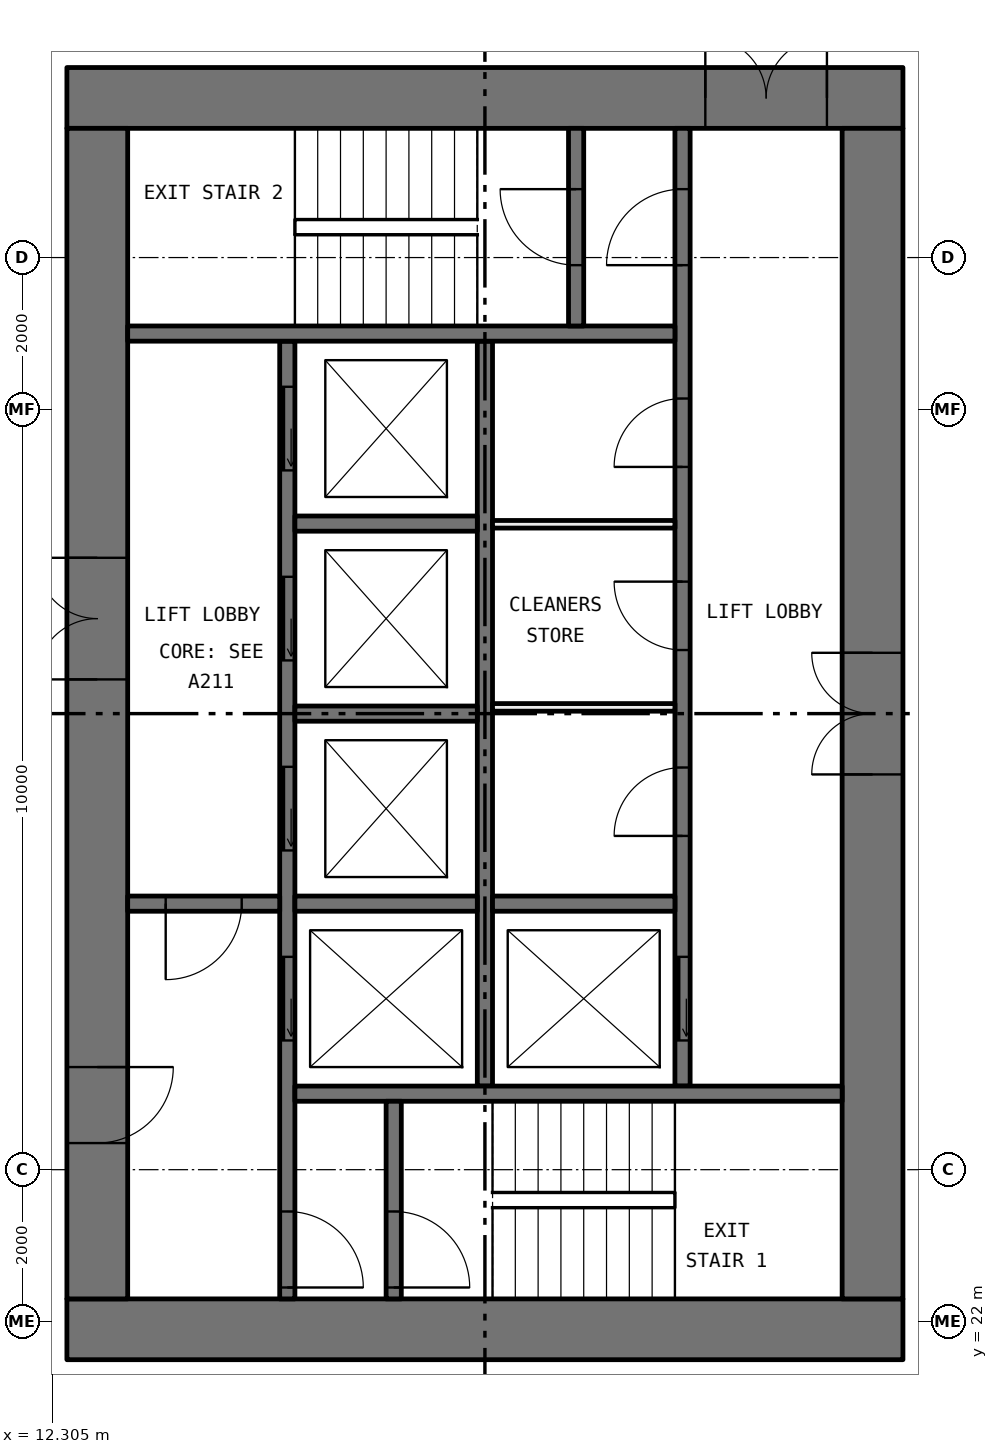
"""IFC4 building model, lengths in metres.
Left out: names, types, materials, properties, quantities, classifications, styles, units other than length and angle.
Written with IfcOpenShell. Run it as: python <this file> out.ifc"""

import sys

from ifc_helpers import new_model, si_unit, direction, frame, frame_2d, origin, place, context, subcontext, project, spatial, rectangle, extrude, element, fill, save


model = new_model("IFC4")
c1 = context("Model", 3, precision=1e-05, world=origin(), true_north=direction((0.0, 1.0)))
c2 = subcontext(c1, "Body", "Model", "MODEL_VIEW")
j1 = project(units=[si_unit("LENGTHUNIT", "METRE"), si_unit("PLANEANGLEUNIT", "RADIAN")], contexts=[c1])
p1 = place(None, origin())
s1 = spatial("IfcSite", under=j1, at=p1, CompositionType="ELEMENT")
p2 = place(p1, origin())
s2 = spatial("IfcBuilding", under=s1, at=p2, CompositionType="ELEMENT")
p3 = place(p2, frame((0.0, 0.0, 47.25)))
s3 = spatial("IfcBuildingStorey", under=s2, at=p3, CompositionType="ELEMENT", Elevation=47.25)
p4 = place(p3, frame((12.5, 21.9, 0.0), z_axis=(0.0, 0.0, 1.0), x_axis=(1.0, 0.0, 0.0)))
e1 = element("IfcWall", 1, at=p4, inside=s3, PredefinedType="SHEAR", context=c2, shape_type="SweptSolid", body=[
    extrude(rectangle(XDim=11.0, YDim=0.8, at=frame_2d((5.5, 0.0))), origin(), (0.0, 0.0, 1.0), 3.05),
])
p5 = place(p3, frame((12.5, 38.1, 0.0), z_axis=(0.0, 0.0, 1.0), x_axis=(1.0, 0.0, 0.0)))
e2 = element("IfcWall", 2, at=p5, inside=s3, PredefinedType="SHEAR", context=c2, shape_type="SweptSolid", body=[
    extrude(rectangle(XDim=11.0, YDim=0.8, at=frame_2d((5.5, 0.0))), origin(), (0.0, 0.0, 1.0), 3.05),
])
p6 = place(p5, frame((8.4, 0.0, 0.0)))
e3 = element("IfcOpeningElement", 3, at=p6, cuts=e2, PredefinedType="OPENING", context=c2, shape_type="SweptSolid", body=[
    extrude(rectangle(XDim=1.6, YDim=2.1, at=frame_2d((0.8, 1.05))), frame((0.0, 0.41, 0.0), z_axis=(0.0, -1.0, 0.0), x_axis=(1.0, 0.0, 0.0)), (0.0, 0.0, 1.0), 0.82),
])
p7 = place(p3, frame((12.9, 22.3, 0.0), z_axis=(0.0, 0.0, 1.0), x_axis=(0.0, 1.0, 0.0)))
e4 = element("IfcWall", 4, at=p7, inside=s3, PredefinedType="SHEAR", context=c2, shape_type="SweptSolid", body=[
    extrude(rectangle(XDim=15.4, YDim=0.8, at=frame_2d((7.7, 0.0))), origin(), (0.0, 0.0, 1.0), 3.05),
])
p8 = place(p7, frame((8.15, 0.0, 0.0)))
e5 = element("IfcOpeningElement", 5, at=p8, cuts=e4, PredefinedType="OPENING", context=c2, shape_type="SweptSolid", body=[
    extrude(rectangle(XDim=1.6, YDim=2.1, at=frame_2d((0.8, 1.05))), frame((0.0, 0.41, 0.0), z_axis=(0.0, -1.0, 0.0), x_axis=(1.0, 0.0, 0.0)), (0.0, 0.0, 1.0), 0.82),
])
p9 = place(p7, frame((2.05, 0.0, 0.0)))
e6 = element("IfcOpeningElement", 6, at=p9, cuts=e4, PredefinedType="OPENING", context=c2, shape_type="SweptSolid", body=[
    extrude(rectangle(XDim=1.0, YDim=2.1, at=frame_2d((0.5, 1.05))), frame((0.0, 0.41, 0.0), z_axis=(0.0, -1.0, 0.0), x_axis=(1.0, 0.0, 0.0)), (0.0, 0.0, 1.0), 0.82),
])
p10 = place(p3, frame((23.1, 22.3, 0.0), z_axis=(0.0, 0.0, 1.0), x_axis=(0.0, 1.0, 0.0)))
e7 = element("IfcWall", 7, at=p10, inside=s3, PredefinedType="SHEAR", context=c2, shape_type="SweptSolid", body=[
    extrude(rectangle(XDim=15.4, YDim=0.8, at=frame_2d((7.7, 0.0))), origin(), (0.0, 0.0, 1.0), 3.05),
])
p11 = place(p10, frame((6.9, 0.0, 0.0)))
e8 = element("IfcOpeningElement", 8, at=p11, cuts=e7, PredefinedType="OPENING", context=c2, shape_type="SweptSolid", body=[
    extrude(rectangle(XDim=1.6, YDim=2.1, at=frame_2d((0.8, 1.05))), frame((0.0, 0.41, 0.0), z_axis=(0.0, -1.0, 0.0), x_axis=(1.0, 0.0, 0.0)), (0.0, 0.0, 1.0), 0.82),
])
p12 = place(p3, frame((15.4, 22.3, 0.0), z_axis=(0.0, 0.0, 1.0), x_axis=(0.0, 1.0, 0.0)))
e9 = element("IfcWall", 9, at=p12, inside=s3, PredefinedType="SOLIDWALL", context=c2, shape_type="SweptSolid", body=[
    extrude(rectangle(XDim=12.6, YDim=0.2, at=frame_2d((6.3, 0.0))), origin(), (0.0, 0.0, 1.0), 3.05),
])
p13 = place(p12, frame((3.4, 0.0, 0.0)))
e10 = element("IfcOpeningElement", 10, at=p13, cuts=e9, PredefinedType="OPENING", context=c2, shape_type="SweptSolid", body=[
    extrude(rectangle(XDim=1.1, YDim=2.1, at=frame_2d((0.55, 1.05))), frame((0.0, 0.11, 0.0), z_axis=(0.0, -1.0, 0.0), x_axis=(1.0, 0.0, 0.0)), (0.0, 0.0, 1.0), 0.22),
])
p14 = place(p12, frame((5.9, 0.0, 0.0)))
e11 = element("IfcOpeningElement", 11, at=p14, cuts=e9, PredefinedType="OPENING", context=c2, shape_type="SweptSolid", body=[
    extrude(rectangle(XDim=1.1, YDim=2.1, at=frame_2d((0.55, 1.05))), frame((0.0, 0.11, 0.0), z_axis=(0.0, -1.0, 0.0), x_axis=(1.0, 0.0, 0.0)), (0.0, 0.0, 1.0), 0.22),
])
p15 = place(p12, frame((8.4, 0.0, 0.0)))
e12 = element("IfcOpeningElement", 12, at=p15, cuts=e9, PredefinedType="OPENING", context=c2, shape_type="SweptSolid", body=[
    extrude(rectangle(XDim=1.1, YDim=2.1, at=frame_2d((0.55, 1.05))), frame((0.0, 0.11, 0.0), z_axis=(0.0, -1.0, 0.0), x_axis=(1.0, 0.0, 0.0)), (0.0, 0.0, 1.0), 0.22),
])
p16 = place(p12, frame((10.9, 0.0, 0.0)))
e13 = element("IfcOpeningElement", 13, at=p16, cuts=e9, PredefinedType="OPENING", context=c2, shape_type="SweptSolid", body=[
    extrude(rectangle(XDim=1.1, YDim=2.1, at=frame_2d((0.55, 1.05))), frame((0.0, 0.11, 0.0), z_axis=(0.0, -1.0, 0.0), x_axis=(1.0, 0.0, 0.0)), (0.0, 0.0, 1.0), 0.22),
])
p17 = place(p12, frame((0.15, 0.0, 0.0)))
e14 = element("IfcOpeningElement", 14, at=p17, cuts=e9, PredefinedType="OPENING", context=c2, shape_type="SweptSolid", body=[
    extrude(rectangle(XDim=1.0, YDim=2.1, at=frame_2d((0.5, 1.05))), frame((0.0, 0.11, 0.0), z_axis=(0.0, -1.0, 0.0), x_axis=(1.0, 0.0, 0.0)), (0.0, 0.0, 1.0), 0.22),
])
p18 = place(p3, frame((20.6, 25.1, 0.0), z_axis=(0.0, 0.0, 1.0), x_axis=(0.0, 1.0, 0.0)))
e15 = element("IfcWall", 15, at=p18, inside=s3, PredefinedType="SOLIDWALL", context=c2, shape_type="SweptSolid", body=[
    extrude(rectangle(XDim=12.6, YDim=0.2, at=frame_2d((6.3, 0.0))), origin(), (0.0, 0.0, 1.0), 3.05),
])
p19 = place(p18, frame((0.6, 0.0, 0.0)))
e16 = element("IfcOpeningElement", 16, at=p19, cuts=e15, PredefinedType="OPENING", context=c2, shape_type="SweptSolid", body=[
    extrude(rectangle(XDim=1.1, YDim=2.1, at=frame_2d((0.55, 1.05))), frame((0.0, 0.11, 0.0), z_axis=(0.0, -1.0, 0.0), x_axis=(1.0, 0.0, 0.0)), (0.0, 0.0, 1.0), 0.22),
])
p20 = place(p18, frame((10.8, 0.0, 0.0)))
e17 = element("IfcOpeningElement", 17, at=p20, cuts=e15, PredefinedType="OPENING", context=c2, shape_type="SweptSolid", body=[
    extrude(rectangle(XDim=1.0, YDim=2.1, at=frame_2d((0.5, 1.05))), frame((0.0, 0.11, 0.0), z_axis=(0.0, -1.0, 0.0), x_axis=(1.0, 0.0, 0.0)), (0.0, 0.0, 1.0), 0.22),
])
p21 = place(p18, frame((3.291, 0.0, 0.0)))
e18 = element("IfcOpeningElement", 18, at=p21, cuts=e15, PredefinedType="OPENING", context=c2, shape_type="SweptSolid", body=[
    extrude(rectangle(XDim=0.9, YDim=2.1, at=frame_2d((0.45, 1.05))), frame((0.0, 0.11, 0.0), z_axis=(0.0, -1.0, 0.0), x_axis=(1.0, 0.0, 0.0)), (0.0, 0.0, 1.0), 0.22),
])
p22 = place(p18, frame((5.737, 0.0, 0.0)))
e19 = element("IfcOpeningElement", 19, at=p22, cuts=e15, PredefinedType="OPENING", context=c2, shape_type="SweptSolid", body=[
    extrude(rectangle(XDim=0.9, YDim=2.1, at=frame_2d((0.45, 1.05))), frame((0.0, 0.11, 0.0), z_axis=(0.0, -1.0, 0.0), x_axis=(1.0, 0.0, 0.0)), (0.0, 0.0, 1.0), 0.22),
])
p23 = place(p18, frame((8.146, 0.0, 0.0)))
e20 = element("IfcOpeningElement", 20, at=p23, cuts=e15, PredefinedType="OPENING", context=c2, shape_type="SweptSolid", body=[
    extrude(rectangle(XDim=0.9, YDim=2.1, at=frame_2d((0.45, 1.05))), frame((0.0, 0.11, 0.0), z_axis=(0.0, -1.0, 0.0), x_axis=(1.0, 0.0, 0.0)), (0.0, 0.0, 1.0), 0.22),
])
p24 = place(p3, frame((18.0, 25.1, 0.0), z_axis=(0.0, 0.0, 1.0), x_axis=(0.0, 1.0, 0.0)))
e21 = element("IfcWall", 21, at=p24, inside=s3, PredefinedType="SOLIDWALL", context=c2, shape_type="SweptSolid", body=[
    extrude(rectangle(XDim=9.8, YDim=0.2, at=frame_2d((4.9, 0.0))), origin(), (0.0, 0.0, 1.0), 3.05),
])
for number, where, z_axis, x_axis in (
    (22, (15.5, 25.0, 0.0), (0.0, 0.0, 1.0), (1.0, 0.0, 0.0)),
    (23, (13.3, 35.0, 0.0), (0.0, 0.0, 1.0), (1.0, 0.0, 0.0)),
):
    element("IfcWall", number, at=place(p3, frame(where, z_axis=z_axis, x_axis=x_axis)), inside=s3, PredefinedType="SOLIDWALL", context=c2, shape_type="SweptSolid", body=[
        extrude(rectangle(XDim=7.2, YDim=0.2, at=frame_2d((3.6, 0.0))), origin(), (0.0, 0.0, 1.0), 3.05),
    ])
p25 = place(p3, frame((13.3, 27.5, 0.0), z_axis=(0.0, 0.0, 1.0), x_axis=(1.0, 0.0, 0.0)))
e24 = element("IfcWall", 24, at=p25, inside=s3, PredefinedType="SOLIDWALL", context=c2, shape_type="SweptSolid", body=[
    extrude(rectangle(XDim=2.0, YDim=0.2, at=frame_2d((1.0, 0.0))), origin(), (0.0, 0.0, 1.0), 3.05),
])
p26 = place(p25, frame((0.5, 0.0, 0.0)))
e25 = element("IfcOpeningElement", 25, at=p26, cuts=e24, PredefinedType="OPENING", context=c2, shape_type="SweptSolid", body=[
    extrude(rectangle(XDim=1.0, YDim=2.1, at=frame_2d((0.5, 1.05))), frame((0.0, 0.11, 0.0), z_axis=(0.0, -1.0, 0.0), x_axis=(1.0, 0.0, 0.0)), (0.0, 0.0, 1.0), 0.22),
])
p27 = place(p3, frame((16.8, 22.3, 0.0), z_axis=(0.0, 0.0, 1.0), x_axis=(0.0, 1.0, 0.0)))
e26 = element("IfcWall", 26, at=p27, inside=s3, PredefinedType="SOLIDWALL", context=c2, shape_type="SweptSolid", body=[
    extrude(rectangle(XDim=2.6, YDim=0.2, at=frame_2d((1.3, 0.0))), origin(), (0.0, 0.0, 1.0), 3.05),
])
p28 = place(p27, frame((0.15, 0.0, 0.0)))
e27 = element("IfcOpeningElement", 27, at=p28, cuts=e26, PredefinedType="OPENING", context=c2, shape_type="SweptSolid", body=[
    extrude(rectangle(XDim=1.0, YDim=2.1, at=frame_2d((0.5, 1.05))), frame((0.0, 0.11, 0.0), z_axis=(0.0, -1.0, 0.0), x_axis=(1.0, 0.0, 0.0)), (0.0, 0.0, 1.0), 0.22),
])
p29 = place(p3, frame((19.2, 35.1, 0.0), z_axis=(0.0, 0.0, 1.0), x_axis=(0.0, 1.0, 0.0)))
e28 = element("IfcWall", 28, at=p29, inside=s3, PredefinedType="SOLIDWALL", context=c2, shape_type="SweptSolid", body=[
    extrude(rectangle(XDim=2.6, YDim=0.2, at=frame_2d((1.3, 0.0))), origin(), (0.0, 0.0, 1.0), 3.05),
])
p30 = place(p29, frame((0.8, 0.0, 0.0)))
e29 = element("IfcOpeningElement", 29, at=p30, cuts=e28, PredefinedType="OPENING", context=c2, shape_type="SweptSolid", body=[
    extrude(rectangle(XDim=1.0, YDim=2.1, at=frame_2d((0.5, 1.05))), frame((0.0, 0.11, 0.0), z_axis=(0.0, -1.0, 0.0), x_axis=(1.0, 0.0, 0.0)), (0.0, 0.0, 1.0), 0.22),
])
for number, where, z_axis, x_axis in (
    (30, (15.5, 27.5, 0.0), (0.0, 0.0, 1.0), (1.0, 0.0, 0.0)),
    (31, (15.5, 30.0, 0.0), (0.0, 0.0, 1.0), (1.0, 0.0, 0.0)),
    (32, (15.5, 32.5, 0.0), (0.0, 0.0, 1.0), (1.0, 0.0, 0.0)),
    (33, (18.1, 27.5, 0.0), (0.0, 0.0, 1.0), (1.0, 0.0, 0.0)),
):
    element("IfcWall", number, at=place(p3, frame(where, z_axis=z_axis, x_axis=x_axis)), inside=s3, PredefinedType="SOLIDWALL", context=c2, shape_type="SweptSolid", body=[
        extrude(rectangle(XDim=2.4, YDim=0.2, at=frame_2d((1.2, 0.0))), origin(), (0.0, 0.0, 1.0), 3.05),
    ])
for number, where, z_axis, x_axis in (
    (34, (18.1, 30.082, 0.0), (0.0, 0.0, 1.0), (1.0, 0.0, 0.0)),
    (35, (18.1, 32.491, 0.0), (0.0, 0.0, 1.0), (1.0, 0.0, 0.0)),
):
    element("IfcWall", number, at=place(p3, frame(where, z_axis=z_axis, x_axis=x_axis)), inside=s3, PredefinedType="PARTITIONING", context=c2, shape_type="SweptSolid", body=[
        extrude(rectangle(XDim=2.4, YDim=0.1, at=frame_2d((1.2, 0.0))), origin(), (0.0, 0.0, 1.0), 3.05),
    ])
p31 = place(p19, origin())
e36 = element("IfcDoor", 36, at=p31, inside=s3, OperationType="SLIDING_TO_LEFT", PredefinedType="DOOR", context=c2, shape_type="SweptSolid", body=[
    extrude(rectangle(XDim=1.1, YDim=2.1, at=frame_2d((0.55, 1.05))), frame((0.0, 0.025, 0.0), z_axis=(0.0, -1.0, 0.0), x_axis=(1.0, 0.0, 0.0)), (0.0, 0.0, 1.0), 0.05),
])
fill(e16, e36)
p32 = place(p13, origin())
e37 = element("IfcDoor", 37, at=p32, inside=s3, OperationType="SLIDING_TO_LEFT", PredefinedType="DOOR", context=c2, shape_type="SweptSolid", body=[
    extrude(rectangle(XDim=1.1, YDim=2.1, at=frame_2d((0.55, 1.05))), frame((0.0, 0.025, 0.0), z_axis=(0.0, -1.0, 0.0), x_axis=(1.0, 0.0, 0.0)), (0.0, 0.0, 1.0), 0.05),
])
fill(e10, e37)
p33 = place(p14, origin())
e38 = element("IfcDoor", 38, at=p33, inside=s3, OperationType="SLIDING_TO_LEFT", PredefinedType="DOOR", context=c2, shape_type="SweptSolid", body=[
    extrude(rectangle(XDim=1.1, YDim=2.1, at=frame_2d((0.55, 1.05))), frame((0.0, 0.025, 0.0), z_axis=(0.0, -1.0, 0.0), x_axis=(1.0, 0.0, 0.0)), (0.0, 0.0, 1.0), 0.05),
])
fill(e11, e38)
p34 = place(p15, origin())
e39 = element("IfcDoor", 39, at=p34, inside=s3, OperationType="SLIDING_TO_LEFT", PredefinedType="DOOR", context=c2, shape_type="SweptSolid", body=[
    extrude(rectangle(XDim=1.1, YDim=2.1, at=frame_2d((0.55, 1.05))), frame((0.0, 0.025, 0.0), z_axis=(0.0, -1.0, 0.0), x_axis=(1.0, 0.0, 0.0)), (0.0, 0.0, 1.0), 0.05),
])
fill(e12, e39)
p35 = place(p16, origin())
e40 = element("IfcDoor", 40, at=p35, inside=s3, OperationType="SLIDING_TO_LEFT", PredefinedType="DOOR", context=c2, shape_type="SweptSolid", body=[
    extrude(rectangle(XDim=1.1, YDim=2.1, at=frame_2d((0.55, 1.05))), frame((0.0, 0.025, 0.0), z_axis=(0.0, -1.0, 0.0), x_axis=(1.0, 0.0, 0.0)), (0.0, 0.0, 1.0), 0.05),
])
fill(e13, e40)
p36 = place(p28, frame((1.0, 0.0, 0.0), x_axis=(-1.0, 0.0, 0.0)))
e41 = element("IfcDoor", 41, at=p36, inside=s3, OperationType="SINGLE_SWING_LEFT", PredefinedType="DOOR", context=c2, shape_type="SweptSolid", body=[
    extrude(rectangle(XDim=1.0, YDim=2.1, at=frame_2d((0.5, 1.05))), frame((0.0, 0.025, 0.0), z_axis=(0.0, -1.0, 0.0), x_axis=(1.0, 0.0, 0.0)), (0.0, 0.0, 1.0), 0.05),
])
fill(e27, e41)
p37 = place(p17, frame((1.0, 0.0, 0.0), x_axis=(-1.0, 0.0, 0.0)))
e42 = element("IfcDoor", 42, at=p37, inside=s3, OperationType="SINGLE_SWING_LEFT", PredefinedType="DOOR", context=c2, shape_type="SweptSolid", body=[
    extrude(rectangle(XDim=1.0, YDim=2.1, at=frame_2d((0.5, 1.05))), frame((0.0, 0.025, 0.0), z_axis=(0.0, -1.0, 0.0), x_axis=(1.0, 0.0, 0.0)), (0.0, 0.0, 1.0), 0.05),
])
fill(e14, e42)
p38 = place(p20, origin())
e43 = element("IfcDoor", 43, at=p38, inside=s3, OperationType="SINGLE_SWING_RIGHT", PredefinedType="DOOR", context=c2, shape_type="SweptSolid", body=[
    extrude(rectangle(XDim=1.0, YDim=2.1, at=frame_2d((0.5, 1.05))), frame((0.0, 0.025, 0.0), z_axis=(0.0, -1.0, 0.0), x_axis=(1.0, 0.0, 0.0)), (0.0, 0.0, 1.0), 0.05),
])
fill(e17, e43)
p39 = place(p30, origin())
e44 = element("IfcDoor", 44, at=p39, inside=s3, OperationType="SINGLE_SWING_LEFT", PredefinedType="DOOR", context=c2, shape_type="SweptSolid", body=[
    extrude(rectangle(XDim=1.0, YDim=2.1, at=frame_2d((0.5, 1.05))), frame((0.0, 0.025, 0.0), z_axis=(0.0, -1.0, 0.0), x_axis=(1.0, 0.0, 0.0)), (0.0, 0.0, 1.0), 0.05),
])
fill(e29, e44)
p40 = place(p26, frame((1.0, 0.0, 0.0), x_axis=(-1.0, 0.0, 0.0)))
e45 = element("IfcDoor", 45, at=p40, inside=s3, OperationType="SINGLE_SWING_LEFT", PredefinedType="DOOR", context=c2, shape_type="SweptSolid", body=[
    extrude(rectangle(XDim=1.0, YDim=2.1, at=frame_2d((0.5, 1.05))), frame((0.0, 0.025, 0.0), z_axis=(0.0, -1.0, 0.0), x_axis=(1.0, 0.0, 0.0)), (0.0, 0.0, 1.0), 0.05),
])
fill(e25, e45)
p41 = place(p8, origin())
e46 = element("IfcDoor", 46, at=p41, inside=s3, OperationType="DOUBLE_DOOR_SINGLE_SWING", PredefinedType="DOOR", context=c2, shape_type="SweptSolid", body=[
    extrude(rectangle(XDim=1.6, YDim=2.1, at=frame_2d((0.8, 1.05))), frame((0.0, 0.025, 0.0), z_axis=(0.0, -1.0, 0.0), x_axis=(1.0, 0.0, 0.0)), (0.0, 0.0, 1.0), 0.05),
])
fill(e5, e46)
p42 = place(p9, frame((1.0, 0.0, 0.0), x_axis=(-1.0, 0.0, 0.0)))
e47 = element("IfcDoor", 47, at=p42, inside=s3, OperationType="SINGLE_SWING_RIGHT", PredefinedType="DOOR", context=c2, shape_type="SweptSolid", body=[
    extrude(rectangle(XDim=1.0, YDim=2.1, at=frame_2d((0.5, 1.05))), frame((0.0, 0.025, 0.0), z_axis=(0.0, -1.0, 0.0), x_axis=(1.0, 0.0, 0.0)), (0.0, 0.0, 1.0), 0.05),
])
fill(e6, e47)
p43 = place(p6, origin())
e48 = element("IfcDoor", 48, at=p43, inside=s3, OperationType="DOUBLE_DOOR_SINGLE_SWING", PredefinedType="DOOR", context=c2, shape_type="SweptSolid", body=[
    extrude(rectangle(XDim=1.6, YDim=2.1, at=frame_2d((0.8, 1.05))), frame((0.0, 0.025, 0.0), z_axis=(0.0, -1.0, 0.0), x_axis=(1.0, 0.0, 0.0)), (0.0, 0.0, 1.0), 0.05),
])
fill(e3, e48)
p44 = place(p11, origin())
e49 = element("IfcDoor", 49, at=p44, inside=s3, OperationType="DOUBLE_DOOR_SINGLE_SWING", PredefinedType="DOOR", context=c2, shape_type="SweptSolid", body=[
    extrude(rectangle(XDim=1.6, YDim=2.1, at=frame_2d((0.8, 1.05))), frame((0.0, 0.025, 0.0), z_axis=(0.0, -1.0, 0.0), x_axis=(1.0, 0.0, 0.0)), (0.0, 0.0, 1.0), 0.05),
])
fill(e8, e49)
p45 = place(p21, origin())
e50 = element("IfcDoor", 50, at=p45, inside=s3, OperationType="SINGLE_SWING_RIGHT", PredefinedType="DOOR", context=c2, shape_type="SweptSolid", body=[
    extrude(rectangle(XDim=0.9, YDim=2.1, at=frame_2d((0.45, 1.05))), frame((0.0, 0.025, 0.0), z_axis=(0.0, -1.0, 0.0), x_axis=(1.0, 0.0, 0.0)), (0.0, 0.0, 1.0), 0.05),
])
fill(e18, e50)
p46 = place(p22, origin())
e51 = element("IfcDoor", 51, at=p46, inside=s3, OperationType="SINGLE_SWING_LEFT", PredefinedType="DOOR", context=c2, shape_type="SweptSolid", body=[
    extrude(rectangle(XDim=0.9, YDim=2.1, at=frame_2d((0.45, 1.05))), frame((0.0, 0.025, 0.0), z_axis=(0.0, -1.0, 0.0), x_axis=(1.0, 0.0, 0.0)), (0.0, 0.0, 1.0), 0.05),
])
fill(e19, e51)
p47 = place(p23, origin())
e52 = element("IfcDoor", 52, at=p47, inside=s3, OperationType="SINGLE_SWING_RIGHT", PredefinedType="DOOR", context=c2, shape_type="SweptSolid", body=[
    extrude(rectangle(XDim=0.9, YDim=2.1, at=frame_2d((0.45, 1.05))), frame((0.0, 0.025, 0.0), z_axis=(0.0, -1.0, 0.0), x_axis=(1.0, 0.0, 0.0)), (0.0, 0.0, 1.0), 0.05),
])
fill(e20, e52)
save(model, sys.argv[1])
